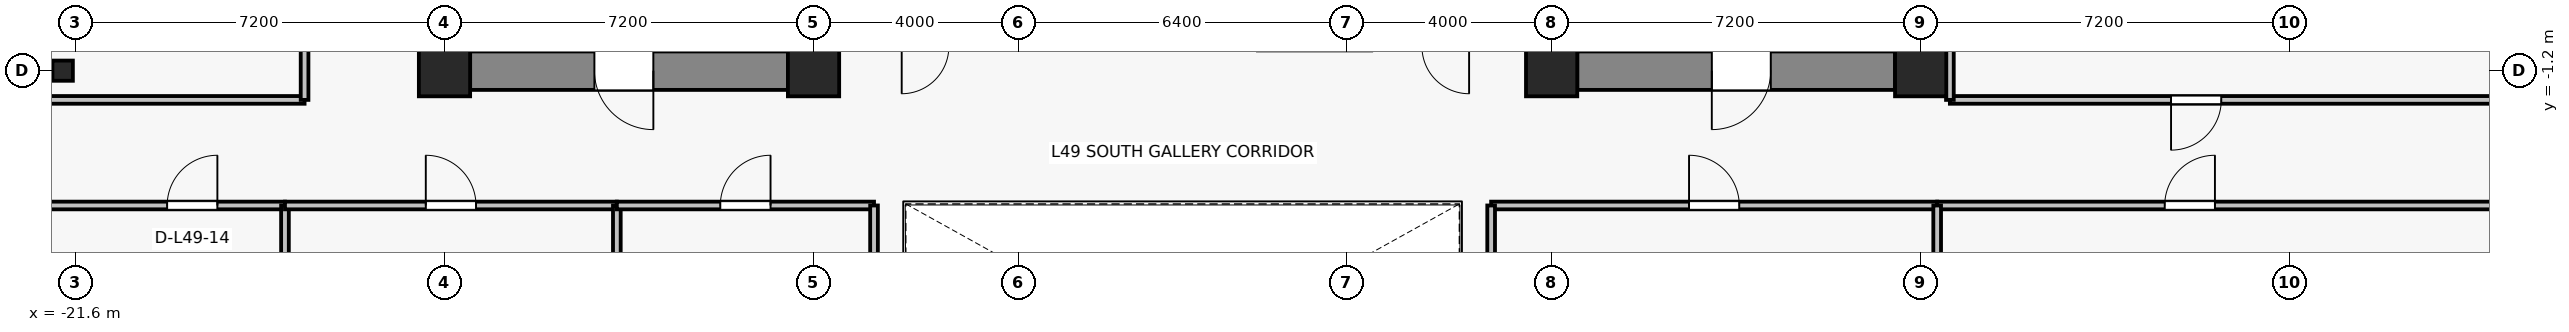
"""IFC4 building model, lengths in metres.
Left out: names, types, materials, properties, quantities, classifications, styles, units other than length and angle.
Written with IfcOpenShell. Run it as: python <this file> out.ifc"""

import sys

from ifc_helpers import new_model, si_unit, direction, frame, frame_2d, origin, origin_2d, place, context, subcontext, project, spatial, rectangle, i_section, extrude, source, transform, mapped, element, fill, save


model = new_model("IFC4")
c1 = context("Model", 3, precision=1e-05, world=origin(), true_north=direction((0.0, 1.0)))
c2 = subcontext(c1, "Body", "Model", "MODEL_VIEW")
j1 = project(units=[si_unit("LENGTHUNIT", "METRE"), si_unit("PLANEANGLEUNIT", "RADIAN")], contexts=[c1])
p1 = place(None, origin())
s1 = spatial("IfcSite", under=j1, at=p1, CompositionType="ELEMENT")
p2 = place(p1, origin())
s2 = spatial("IfcBuilding", under=s1, at=p2, CompositionType="ELEMENT")
p3 = place(p2, frame((0.0, 0.0, 175.9)))
s3 = spatial("IfcBuildingStorey", under=s2, at=p3, CompositionType="ELEMENT", Elevation=175.9)
for number, where, z_axis, x_axis in (
    (1, (-14.4, -1.2, 0.0), (0.0, 0.0, 1.0), (1.0, 0.0, 0.0)),
    (2, (-7.2, -1.2, 0.0), (0.0, 0.0, 1.0), (1.0, 0.0, 0.0)),
    (3, (7.2, -1.2, 0.0), (0.0, 0.0, 1.0), (1.0, 0.0, 0.0)),
    (4, (14.4, -1.2, 0.0), (0.0, 0.0, 1.0), (1.0, 0.0, 0.0)),
):
    element("IfcColumn", number, at=place(p3, frame(where, z_axis=z_axis, x_axis=x_axis)), inside=s3, PredefinedType="COLUMN", context=c2, shape_type="SweptSolid", body=[
        extrude(rectangle(XDim=1.0, YDim=1.0, at=origin_2d()), origin(), (0.0, 0.0, 1.0), 3.3),
    ])
p4 = place(p3, frame((-21.85, -1.2, 0.0), z_axis=(0.0, 0.0, 1.0), x_axis=(1.0, 0.0, 0.0)))
e5 = element("IfcColumn", 5, at=p4, inside=s3, PredefinedType="COLUMN", context=c2, shape_type="SweptSolid", body=[
    extrude(i_section(OverallWidth=0.399, OverallDepth=0.394, WebThickness=0.023, FlangeThickness=0.037, FilletRadius=0.015, at=origin_2d()), origin(), (0.0, 0.0, 1.0), 3.3),
])
p5 = place(p3, frame((-7.7, -1.2, 0.0), z_axis=(0.0, 0.0, 1.0), x_axis=(-1.0, 0.0, 0.0)))
e6 = element("IfcWall", 6, at=p5, inside=s3, PredefinedType="SHEAR", context=c2, shape_type="SweptSolid", body=[
    extrude(rectangle(XDim=6.2, YDim=0.75, at=frame_2d((3.1, 0.0))), origin(), (0.0, 0.0, 1.0), 3.075),
])
p6 = place(p5, frame((2.625, 0.0, 0.0)))
e7 = element("IfcOpeningElement", 7, at=p6, cuts=e6, PredefinedType="OPENING", context=c2, shape_type="SweptSolid", body=[
    extrude(rectangle(XDim=1.15, YDim=2.15, at=frame_2d((0.575, 1.075))), frame((0.0, 0.385, 0.0), z_axis=(0.0, -1.0, 0.0), x_axis=(1.0, 0.0, 0.0)), (0.0, 0.0, 1.0), 0.77),
])
p7 = place(p3, frame((13.9, -1.2, 0.0), z_axis=(0.0, 0.0, 1.0), x_axis=(-1.0, 0.0, 0.0)))
e8 = element("IfcWall", 8, at=p7, inside=s3, PredefinedType="SHEAR", context=c2, shape_type="SweptSolid", body=[
    extrude(rectangle(XDim=6.2, YDim=0.75, at=frame_2d((3.1, 0.0))), origin(), (0.0, 0.0, 1.0), 3.075),
])
p8 = place(p7, frame((2.425, 0.0, 0.0)))
e9 = element("IfcOpeningElement", 9, at=p8, cuts=e8, PredefinedType="OPENING", context=c2, shape_type="SweptSolid", body=[
    extrude(rectangle(XDim=1.15, YDim=2.15, at=frame_2d((0.575, 1.075))), frame((0.0, 0.385, 0.0), z_axis=(0.0, -1.0, 0.0), x_axis=(1.0, 0.0, 0.0)), (0.0, 0.0, 1.0), 0.77),
])
p9 = place(p3, frame((-22.53, -3.83, 0.0), z_axis=(0.0, 0.0, 1.0), x_axis=(1.0, 0.0, 0.0)))
e10 = element("IfcWall", 10, at=p9, inside=s3, PredefinedType="PARTITIONING", context=c2, shape_type="SweptSolid", body=[
    extrude(rectangle(XDim=5.018, YDim=0.15, at=frame_2d((2.509, 0.0))), origin(), (0.0, 0.0, 1.0), 2.565),
])
p10 = place(p9, frame((2.719, 0.0, 0.0)))
e11 = element("IfcOpeningElement", 11, at=p10, cuts=e10, PredefinedType="OPENING", context=c2, shape_type="SweptSolid", body=[
    extrude(rectangle(XDim=0.98, YDim=2.15, at=frame_2d((0.49, 1.075))), frame((0.0, 0.085, 0.0), z_axis=(0.0, -1.0, 0.0), x_axis=(1.0, 0.0, 0.0)), (0.0, 0.0, 1.0), 0.17),
])
p11 = place(p3, frame((-17.512, -3.83, 0.0), z_axis=(0.0, 0.0, 1.0), x_axis=(0.0, -1.0, 0.0)))
e12 = element("IfcWall", 12, at=p11, inside=s3, PredefinedType="PARTITIONING", context=c2, shape_type="SweptSolid", body=[
    extrude(rectangle(XDim=13.5, YDim=0.15, at=frame_2d((6.75, 0.0))), origin(), (0.0, 0.0, 1.0), 2.565),
])
p12 = place(p3, frame((-17.512, -3.83, 0.0), z_axis=(0.0, 0.0, 1.0), x_axis=(1.0, 0.0, 0.0)))
e13 = element("IfcWall", 13, at=p12, inside=s3, PredefinedType="PARTITIONING", context=c2, shape_type="SweptSolid", body=[
    extrude(rectangle(XDim=6.475, YDim=0.15, at=frame_2d((3.237, 0.0))), origin(), (0.0, 0.0, 1.0), 2.565),
])
p13 = place(p12, frame((2.747, 0.0, 0.0)))
e14 = element("IfcOpeningElement", 14, at=p13, cuts=e13, PredefinedType="OPENING", context=c2, shape_type="SweptSolid", body=[
    extrude(rectangle(XDim=0.98, YDim=2.15, at=frame_2d((0.49, 1.075))), frame((0.0, 0.085, 0.0), z_axis=(0.0, -1.0, 0.0), x_axis=(1.0, 0.0, 0.0)), (0.0, 0.0, 1.0), 0.17),
])
p14 = place(p3, frame((-11.038, -3.83, 0.0), z_axis=(0.0, 0.0, 1.0), x_axis=(0.0, -1.0, 0.0)))
e15 = element("IfcWall", 15, at=p14, inside=s3, PredefinedType="PARTITIONING", context=c2, shape_type="SweptSolid", body=[
    extrude(rectangle(XDim=13.5, YDim=0.15, at=frame_2d((6.75, 0.0))), origin(), (0.0, 0.0, 1.0), 2.565),
])
p15 = place(p3, frame((-11.038, -3.83, 0.0), z_axis=(0.0, 0.0, 1.0), x_axis=(1.0, 0.0, 0.0)))
e16 = element("IfcWall", 16, at=p15, inside=s3, PredefinedType="PARTITIONING", context=c2, shape_type="SweptSolid", body=[
    extrude(rectangle(XDim=5.018, YDim=0.15, at=frame_2d((2.509, 0.0))), origin(), (0.0, 0.0, 1.0), 2.565),
])
p16 = place(p15, frame((2.019, 0.0, 0.0)))
e17 = element("IfcOpeningElement", 17, at=p16, cuts=e16, PredefinedType="OPENING", context=c2, shape_type="SweptSolid", body=[
    extrude(rectangle(XDim=0.98, YDim=2.15, at=frame_2d((0.49, 1.075))), frame((0.0, 0.085, 0.0), z_axis=(0.0, -1.0, 0.0), x_axis=(1.0, 0.0, 0.0)), (0.0, 0.0, 1.0), 0.17),
])
p17 = place(p3, frame((-6.02, -3.83, 0.0), z_axis=(0.0, 0.0, 1.0), x_axis=(0.0, -1.0, 0.0)))
e18 = element("IfcWall", 18, at=p17, inside=s3, PredefinedType="PARTITIONING", context=c2, shape_type="SweptSolid", body=[
    extrude(rectangle(XDim=13.5, YDim=0.15, at=frame_2d((6.75, 0.0))), origin(), (0.0, 0.0, 1.0), 2.565),
])
p18 = place(p3, frame((6.02, -3.83, 0.0), z_axis=(0.0, 0.0, 1.0), x_axis=(1.0, 0.0, 0.0)))
e19 = element("IfcWall", 19, at=p18, inside=s3, PredefinedType="PARTITIONING", context=c2, shape_type="SweptSolid", body=[
    extrude(rectangle(XDim=8.702, YDim=0.15, at=frame_2d((4.351, 0.0))), origin(), (0.0, 0.0, 1.0), 2.565),
])
p19 = place(p18, frame((3.861, 0.0, 0.0)))
e20 = element("IfcOpeningElement", 20, at=p19, cuts=e19, PredefinedType="OPENING", context=c2, shape_type="SweptSolid", body=[
    extrude(rectangle(XDim=0.98, YDim=2.15, at=frame_2d((0.49, 1.075))), frame((0.0, 0.085, 0.0), z_axis=(0.0, -1.0, 0.0), x_axis=(1.0, 0.0, 0.0)), (0.0, 0.0, 1.0), 0.17),
])
p20 = place(p3, frame((6.02, -17.33, 0.0), z_axis=(0.0, 0.0, 1.0), x_axis=(0.0, 1.0, 0.0)))
e21 = element("IfcWall", 21, at=p20, inside=s3, PredefinedType="PARTITIONING", context=c2, shape_type="SweptSolid", body=[
    extrude(rectangle(XDim=13.5, YDim=0.15, at=frame_2d((6.75, 0.0))), origin(), (0.0, 0.0, 1.0), 2.565),
])
p21 = place(p3, frame((14.722, -3.83, 0.0), z_axis=(0.0, 0.0, 1.0), x_axis=(1.0, 0.0, 0.0)))
e22 = element("IfcWall", 22, at=p21, inside=s3, PredefinedType="PARTITIONING", context=c2, shape_type="SweptSolid", body=[
    extrude(rectangle(XDim=11.808, YDim=0.15, at=frame_2d((5.904, 0.0))), origin(), (0.0, 0.0, 1.0), 2.565),
])
p22 = place(p21, frame((4.439, 0.0, 0.0)))
e23 = element("IfcOpeningElement", 23, at=p22, cuts=e22, PredefinedType="OPENING", context=c2, shape_type="SweptSolid", body=[
    extrude(rectangle(XDim=0.98, YDim=2.15, at=frame_2d((0.49, 1.075))), frame((0.0, 0.085, 0.0), z_axis=(0.0, -1.0, 0.0), x_axis=(1.0, 0.0, 0.0)), (0.0, 0.0, 1.0), 0.17),
])
p23 = place(p3, frame((14.722, -9.18, 0.0), z_axis=(0.0, 0.0, 1.0), x_axis=(0.0, 1.0, 0.0)))
e24 = element("IfcWall", 24, at=p23, inside=s3, PredefinedType="PARTITIONING", context=c2, shape_type="SweptSolid", body=[
    extrude(rectangle(XDim=5.35, YDim=0.15, at=frame_2d((2.675, 0.0))), origin(), (0.0, 0.0, 1.0), 3.075),
])
p24 = place(p3, frame((-17.13, -1.77, 0.0), z_axis=(0.0, 0.0, 1.0), x_axis=(-1.0, 0.0, 0.0)))
e25 = element("IfcWall", 25, at=p24, inside=s3, PredefinedType="PARTITIONING", context=c2, shape_type="SweptSolid", body=[
    extrude(rectangle(XDim=5.4, YDim=0.15, at=frame_2d((2.7, 0.0))), origin(), (0.0, 0.0, 1.0), 2.565),
])
p25 = place(p3, frame((-17.13, 3.298, 0.0), z_axis=(0.0, 0.0, 1.0), x_axis=(0.0, -1.0, 0.0)))
e26 = element("IfcWall", 26, at=p25, inside=s3, PredefinedType="PARTITIONING", context=c2, shape_type="SweptSolid", body=[
    extrude(rectangle(XDim=5.068, YDim=0.15, at=frame_2d((2.534, 0.0))), origin(), (0.0, 0.0, 1.0), 2.565),
])
p26 = place(p25, frame((2.044, 0.0, 0.0)))
e27 = element("IfcOpeningElement", 27, at=p26, cuts=e26, PredefinedType="OPENING", context=c2, shape_type="SweptSolid", body=[
    extrude(rectangle(XDim=0.98, YDim=2.15, at=frame_2d((0.49, 1.075))), frame((0.0, 0.085, 0.0), z_axis=(0.0, -1.0, 0.0), x_axis=(1.0, 0.0, 0.0)), (0.0, 0.0, 1.0), 0.17),
])
p27 = place(p3, frame((26.53, -1.77, 0.0), z_axis=(0.0, 0.0, 1.0), x_axis=(-1.0, 0.0, 0.0)))
e28 = element("IfcWall", 28, at=p27, inside=s3, PredefinedType="PARTITIONING", context=c2, shape_type="SweptSolid", body=[
    extrude(rectangle(XDim=11.56, YDim=0.15, at=frame_2d((5.78, 0.0))), origin(), (0.0, 0.0, 1.0), 2.565),
])
p28 = place(p27, frame((6.265, 0.0, 0.0)))
e29 = element("IfcOpeningElement", 29, at=p28, cuts=e28, PredefinedType="OPENING", context=c2, shape_type="SweptSolid", body=[
    extrude(rectangle(XDim=0.98, YDim=2.15, at=frame_2d((0.49, 1.075))), frame((0.0, 0.085, 0.0), z_axis=(0.0, -1.0, 0.0), x_axis=(1.0, 0.0, 0.0)), (0.0, 0.0, 1.0), 0.17),
])
p29 = place(p3, frame((14.97, -1.77, 0.0), z_axis=(0.0, 0.0, 1.0), x_axis=(0.0, 1.0, 0.0)))
e30 = element("IfcWall", 30, at=p29, inside=s3, PredefinedType="PARTITIONING", context=c2, shape_type="SweptSolid", body=[
    extrude(rectangle(XDim=1.07, YDim=0.15, at=frame_2d((0.535, 0.0))), origin(), (0.0, 0.0, 1.0), 2.565),
])
m1 = source(origin(), c2, "Body", "SweptSolid", [
    extrude(rectangle(XDim=1.15, YDim=2.15, at=frame_2d((0.575, 1.075))), frame((0.0, 0.025, 0.0), z_axis=(0.0, -1.0, 0.0), x_axis=(1.0, 0.0, 0.0)), (0.0, 0.0, 1.0), 0.05),
])
p30 = place(p6, origin())
e31 = element("IfcDoor", 31, at=p30, inside=s3, OperationType="SINGLE_SWING_LEFT", PredefinedType="DOOR", context=c2, shape_type="MappedRepresentation", body=[
    mapped(m1, transform((0.0, 0.0, 0.0), x_axis=(1.0, 0.0, 0.0), y_axis=(0.0, 1.0, 0.0), z_axis=(0.0, 0.0, 1.0), scale=1.0)),
])
fill(e7, e31)
p31 = place(p8, origin())
e32 = element("IfcDoor", 32, at=p31, inside=s3, OperationType="SINGLE_SWING_RIGHT", PredefinedType="DOOR", context=c2, shape_type="MappedRepresentation", body=[
    mapped(m1, transform((0.0, 0.0, 0.0), x_axis=(1.0, 0.0, 0.0), y_axis=(0.0, 1.0, 0.0), z_axis=(0.0, 0.0, 1.0), scale=1.0)),
])
fill(e9, e32)
m2 = source(origin(), c2, "Body", "SweptSolid", [
    extrude(rectangle(XDim=0.98, YDim=2.15, at=frame_2d((0.49, 1.075))), frame((0.0, 0.025, 0.0), z_axis=(0.0, -1.0, 0.0), x_axis=(1.0, 0.0, 0.0)), (0.0, 0.0, 1.0), 0.05),
])
p32 = place(p10, origin())
e33 = element("IfcDoor", 33, at=p32, inside=s3, OperationType="SINGLE_SWING_RIGHT", PredefinedType="DOOR", context=c2, shape_type="MappedRepresentation", body=[
    mapped(m2, transform((0.0, 0.0, 0.0), x_axis=(1.0, 0.0, 0.0), y_axis=(0.0, 1.0, 0.0), z_axis=(0.0, 0.0, 1.0), scale=1.0)),
])
fill(e11, e33)
p33 = place(p13, origin())
e34 = element("IfcDoor", 34, at=p33, inside=s3, OperationType="SINGLE_SWING_LEFT", PredefinedType="DOOR", context=c2, shape_type="MappedRepresentation", body=[
    mapped(m2, transform((0.0, 0.0, 0.0), x_axis=(1.0, 0.0, 0.0), y_axis=(0.0, 1.0, 0.0), z_axis=(0.0, 0.0, 1.0), scale=1.0)),
])
fill(e14, e34)
p34 = place(p16, origin())
e35 = element("IfcDoor", 35, at=p34, inside=s3, OperationType="SINGLE_SWING_RIGHT", PredefinedType="DOOR", context=c2, shape_type="MappedRepresentation", body=[
    mapped(m2, transform((0.0, 0.0, 0.0), x_axis=(1.0, 0.0, 0.0), y_axis=(0.0, 1.0, 0.0), z_axis=(0.0, 0.0, 1.0), scale=1.0)),
])
fill(e17, e35)
p35 = place(p19, origin())
e36 = element("IfcDoor", 36, at=p35, inside=s3, OperationType="SINGLE_SWING_LEFT", PredefinedType="DOOR", context=c2, shape_type="MappedRepresentation", body=[
    mapped(m2, transform((0.0, 0.0, 0.0), x_axis=(1.0, 0.0, 0.0), y_axis=(0.0, 1.0, 0.0), z_axis=(0.0, 0.0, 1.0), scale=1.0)),
])
fill(e20, e36)
p36 = place(p22, origin())
e37 = element("IfcDoor", 37, at=p36, inside=s3, OperationType="SINGLE_SWING_RIGHT", PredefinedType="DOOR", context=c2, shape_type="MappedRepresentation", body=[
    mapped(m2, transform((0.0, 0.0, 0.0), x_axis=(1.0, 0.0, 0.0), y_axis=(0.0, 1.0, 0.0), z_axis=(0.0, 0.0, 1.0), scale=1.0)),
])
fill(e23, e37)
p37 = place(p28, origin())
e38 = element("IfcDoor", 38, at=p37, inside=s3, OperationType="SINGLE_SWING_RIGHT", PredefinedType="DOOR", context=c2, shape_type="MappedRepresentation", body=[
    mapped(m2, transform((0.0, 0.0, 0.0), x_axis=(1.0, 0.0, 0.0), y_axis=(0.0, 1.0, 0.0), z_axis=(0.0, 0.0, 1.0), scale=1.0)),
])
fill(e29, e38)
save(model, sys.argv[1])
